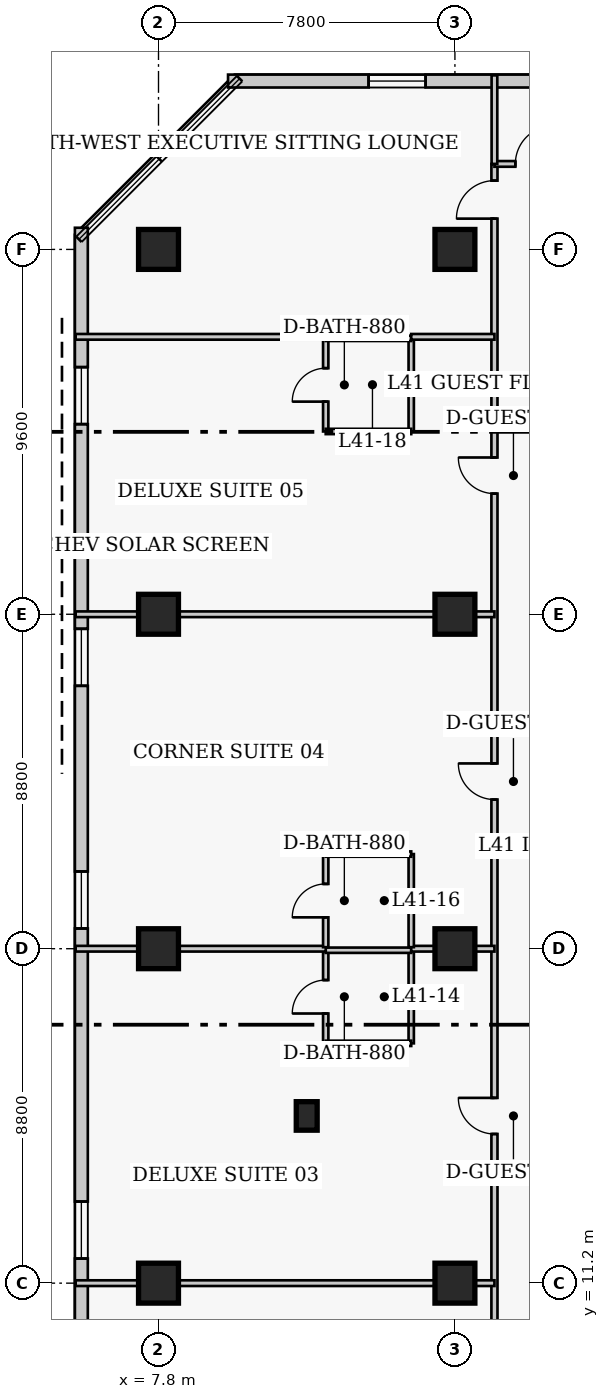
"""IFC4 building model, lengths in metres.
Left out: names, types, materials, properties, quantities, classifications, styles, units other than length and angle.
Written with IfcOpenShell. Run it as: python <this file> out.ifc"""

import sys

from ifc_helpers import new_model, si_unit, direction, frame, frame_2d, origin, origin_2d, place, context, subcontext, project, spatial, rectangle, extrude, element, fill, save


model = new_model("IFC4")
c1 = context("Model", 3, precision=1e-05, world=origin(), true_north=direction((0.0, 1.0)))
c2 = subcontext(c1, "Body", "Model", "MODEL_VIEW")
j1 = project(units=[si_unit("LENGTHUNIT", "METRE"), si_unit("PLANEANGLEUNIT", "RADIAN")], contexts=[c1])
p1 = place(None, origin())
s1 = spatial("IfcSite", under=j1, at=p1, CompositionType="ELEMENT")
p2 = place(p1, origin())
s2 = spatial("IfcBuilding", under=s1, at=p2, CompositionType="ELEMENT")
p3 = place(p2, frame((0.0, 0.0, 165.0)))
s3 = spatial("IfcBuildingStorey", under=s2, at=p3, CompositionType="ELEMENT", Elevation=165.0)
for number, where, z_axis, x_axis in (
    (1, (7.8, 11.2, 0.0), (0.0, 0.0, 1.0), (1.0, 0.0, 0.0)),
    (2, (7.8, 20.0, 0.0), (0.0, 0.0, 1.0), (1.0, 0.0, 0.0)),
    (3, (7.8, 28.8, 0.0), (0.0, 0.0, 1.0), (1.0, 0.0, 0.0)),
    (4, (7.8, 38.4, 0.0), (0.0, 0.0, 1.0), (1.0, 0.0, 0.0)),
    (5, (15.6, 11.2, 0.0), (0.0, 0.0, 1.0), (1.0, 0.0, 0.0)),
    (6, (15.6, 20.0, 0.0), (0.0, 0.0, 1.0), (1.0, 0.0, 0.0)),
    (7, (15.6, 28.8, 0.0), (0.0, 0.0, 1.0), (1.0, 0.0, 0.0)),
    (8, (15.6, 38.4, 0.0), (0.0, 0.0, 1.0), (1.0, 0.0, 0.0)),
):
    element("IfcColumn", number, at=place(p3, frame(where, z_axis=z_axis, x_axis=x_axis)), inside=s3, PredefinedType="COLUMN", context=c2, shape_type="SweptSolid", body=[
        extrude(rectangle(XDim=1.05, YDim=1.05, at=origin_2d()), origin(), (0.0, 0.0, 1.0), 3.8),
    ])
p4 = place(p3, frame((11.7, 15.6, 0.0), z_axis=(0.0, 0.0, 1.0), x_axis=(1.0, 0.0, 0.0)))
e9 = element("IfcColumn", 9, at=p4, inside=s3, PredefinedType="PILASTER", context=c2, shape_type="SweptSolid", body=[
    extrude(rectangle(XDim=0.55, YDim=0.75, at=origin_2d()), origin(), (0.0, 0.0, 1.0), 3.8),
])
p5 = place(p3, frame((36.32, 42.83, 0.0), z_axis=(0.0, 0.0, 1.0), x_axis=(-1.0, 0.0, 0.0)))
e10 = element("IfcWall", 10, at=p5, inside=s3, PredefinedType="SOLIDWALL", context=c2, shape_type="SweptSolid", body=[
    extrude(rectangle(XDim=26.69, YDim=0.34, at=frame_2d((13.345, 0.0))), origin(), (0.0, 0.0, 1.0), 3.55),
])
p6 = place(p5, frame((2.548, 0.0, 0.85)))
e11 = element("IfcOpeningElement", 11, at=p6, cuts=e10, PredefinedType="OPENING", context=c2, shape_type="SweptSolid", body=[
    extrude(rectangle(XDim=1.5, YDim=1.75, at=frame_2d((0.75, 0.875))), frame((0.0, 0.18, 0.0), z_axis=(0.0, -1.0, 0.0), x_axis=(1.0, 0.0, 0.0)), (0.0, 0.0, 1.0), 0.36),
])
p7 = place(p5, frame((12.595, 0.0, 0.85)))
e12 = element("IfcOpeningElement", 12, at=p7, cuts=e10, PredefinedType="OPENING", context=c2, shape_type="SweptSolid", body=[
    extrude(rectangle(XDim=1.5, YDim=1.75, at=frame_2d((0.75, 0.875))), frame((0.0, 0.18, 0.0), z_axis=(0.0, -1.0, 0.0), x_axis=(1.0, 0.0, 0.0)), (0.0, 0.0, 1.0), 0.36),
])
p8 = place(p5, frame((21.492, 0.0, 0.85)))
e13 = element("IfcOpeningElement", 13, at=p8, cuts=e10, PredefinedType="OPENING", context=c2, shape_type="SweptSolid", body=[
    extrude(rectangle(XDim=1.5, YDim=1.75, at=frame_2d((0.75, 0.875))), frame((0.0, 0.18, 0.0), z_axis=(0.0, -1.0, 0.0), x_axis=(1.0, 0.0, 0.0)), (0.0, 0.0, 1.0), 0.36),
])
p9 = place(p3, frame((5.77, 38.97, 0.0), z_axis=(0.0, 0.0, 1.0), x_axis=(0.0, -1.0, 0.0)))
e14 = element("IfcWall", 14, at=p9, inside=s3, PredefinedType="SOLIDWALL", context=c2, shape_type="SweptSolid", body=[
    extrude(rectangle(XDim=30.14, YDim=0.34, at=frame_2d((15.07, 0.0))), origin(), (0.0, 0.0, 1.0), 3.55),
])
p10 = place(p9, frame((3.667, 0.0, 0.85)))
e15 = element("IfcOpeningElement", 15, at=p10, cuts=e14, PredefinedType="OPENING", context=c2, shape_type="SweptSolid", body=[
    extrude(rectangle(XDim=1.5, YDim=1.75, at=frame_2d((0.75, 0.875))), frame((0.0, 0.18, 0.0), z_axis=(0.0, -1.0, 0.0), x_axis=(1.0, 0.0, 0.0)), (0.0, 0.0, 1.0), 0.36),
])
p11 = place(p9, frame((10.552, 0.0, 0.85)))
e16 = element("IfcOpeningElement", 16, at=p11, cuts=e14, PredefinedType="OPENING", context=c2, shape_type="SweptSolid", body=[
    extrude(rectangle(XDim=1.5, YDim=1.75, at=frame_2d((0.75, 0.875))), frame((0.0, 0.18, 0.0), z_axis=(0.0, -1.0, 0.0), x_axis=(1.0, 0.0, 0.0)), (0.0, 0.0, 1.0), 0.36),
])
p12 = place(p9, frame((16.938, 0.0, 0.85)))
e17 = element("IfcOpeningElement", 17, at=p12, cuts=e14, PredefinedType="OPENING", context=c2, shape_type="SweptSolid", body=[
    extrude(rectangle(XDim=1.5, YDim=1.75, at=frame_2d((0.75, 0.875))), frame((0.0, 0.18, 0.0), z_axis=(0.0, -1.0, 0.0), x_axis=(1.0, 0.0, 0.0)), (0.0, 0.0, 1.0), 0.36),
])
p13 = place(p9, frame((25.623, 0.0, 0.85)))
e18 = element("IfcOpeningElement", 18, at=p13, cuts=e14, PredefinedType="OPENING", context=c2, shape_type="SweptSolid", body=[
    extrude(rectangle(XDim=1.5, YDim=1.75, at=frame_2d((0.75, 0.875))), frame((0.0, 0.18, 0.0), z_axis=(0.0, -1.0, 0.0), x_axis=(1.0, 0.0, 0.0)), (0.0, 0.0, 1.0), 0.36),
])
p14 = place(p3, frame((16.64, 6.85, 0.0), z_axis=(0.0, 0.0, 1.0), x_axis=(0.0, 1.0, 0.0)))
e19 = element("IfcWall", 19, at=p14, inside=s3, PredefinedType="PARTITIONING", context=c2, shape_type="SweptSolid", body=[
    extrude(rectangle(XDim=33.8, YDim=0.16, at=frame_2d((16.9, 0.0))), origin(), (0.0, 0.0, 1.0), 3.55),
])
p15 = place(p14, frame((1.7, 0.0, 0.0)))
e20 = element("IfcOpeningElement", 20, at=p15, cuts=e19, PredefinedType="OPENING", context=c2, shape_type="SweptSolid", body=[
    extrude(rectangle(XDim=0.95, YDim=2.1, at=frame_2d((0.475, 1.05))), frame((0.0, 0.09, 0.0), z_axis=(0.0, -1.0, 0.0), x_axis=(1.0, 0.0, 0.0)), (0.0, 0.0, 1.0), 0.18),
])
p16 = place(p14, frame((8.275, 0.0, 0.0)))
e21 = element("IfcOpeningElement", 21, at=p16, cuts=e19, PredefinedType="OPENING", context=c2, shape_type="SweptSolid", body=[
    extrude(rectangle(XDim=0.95, YDim=2.1, at=frame_2d((0.475, 1.05))), frame((0.0, 0.09, 0.0), z_axis=(0.0, -1.0, 0.0), x_axis=(1.0, 0.0, 0.0)), (0.0, 0.0, 1.0), 0.18),
])
p17 = place(p14, frame((17.075, 0.0, 0.0)))
e22 = element("IfcOpeningElement", 22, at=p17, cuts=e19, PredefinedType="OPENING", context=c2, shape_type="SweptSolid", body=[
    extrude(rectangle(XDim=0.95, YDim=2.1, at=frame_2d((0.475, 1.05))), frame((0.0, 0.09, 0.0), z_axis=(0.0, -1.0, 0.0), x_axis=(1.0, 0.0, 0.0)), (0.0, 0.0, 1.0), 0.18),
])
p18 = place(p14, frame((25.125, 0.0, 0.0)))
e23 = element("IfcOpeningElement", 23, at=p18, cuts=e19, PredefinedType="OPENING", context=c2, shape_type="SweptSolid", body=[
    extrude(rectangle(XDim=0.95, YDim=2.1, at=frame_2d((0.475, 1.05))), frame((0.0, 0.09, 0.0), z_axis=(0.0, -1.0, 0.0), x_axis=(1.0, 0.0, 0.0)), (0.0, 0.0, 1.0), 0.18),
])
p19 = place(p14, frame((32.36, 0.0, 0.0)))
e24 = element("IfcOpeningElement", 24, at=p19, cuts=e19, PredefinedType="OPENING", context=c2, shape_type="SweptSolid", body=[
    extrude(rectangle(XDim=1.0, YDim=2.15, at=frame_2d((0.5, 1.075))), frame((0.0, 0.09, 0.0), z_axis=(0.0, -1.0, 0.0), x_axis=(1.0, 0.0, 0.0)), (0.0, 0.0, 1.0), 0.18),
])
p20 = place(p3, frame((16.64, 40.65, 0.0), z_axis=(0.0, 0.0, 1.0), x_axis=(1.0, 0.0, 0.0)))
e25 = element("IfcWall", 25, at=p20, inside=s3, PredefinedType="PARTITIONING", context=c2, shape_type="SweptSolid", body=[
    extrude(rectangle(XDim=5.46, YDim=0.15, at=frame_2d((2.73, 0.0))), origin(), (0.0, 0.0, 1.0), 3.55),
])
p21 = place(p20, frame((0.55, 0.0, 0.0)))
e26 = element("IfcOpeningElement", 26, at=p21, cuts=e25, PredefinedType="OPENING", context=c2, shape_type="SweptSolid", body=[
    extrude(rectangle(XDim=1.0, YDim=2.15, at=frame_2d((0.5, 1.075))), frame((0.0, 0.085, 0.0), z_axis=(0.0, -1.0, 0.0), x_axis=(1.0, 0.0, 0.0)), (0.0, 0.0, 1.0), 0.17),
])
p22 = place(p3, frame((16.64, 40.65, 0.0), z_axis=(0.0, 0.0, 1.0), x_axis=(0.0, 1.0, 0.0)))
e27 = element("IfcWall", 27, at=p22, inside=s3, PredefinedType="PARTITIONING", context=c2, shape_type="SweptSolid", body=[
    extrude(rectangle(XDim=2.33, YDim=0.15, at=frame_2d((1.165, 0.0))), origin(), (0.0, 0.0, 1.0), 3.55),
])
p23 = place(p3, frame((5.62, 11.2, 0.0), z_axis=(0.0, 0.0, 1.0), x_axis=(1.0, 0.0, 0.0)))
e28 = element("IfcWall", 28, at=p23, inside=s3, PredefinedType="PARTITIONING", context=c2, shape_type="SweptSolid", body=[
    extrude(rectangle(XDim=11.02, YDim=0.15, at=frame_2d((5.51, 0.0))), origin(), (0.0, 0.0, 1.0), 2.778),
])
p24 = place(p3, frame((12.2, 17.51, 0.0), z_axis=(0.0, 0.0, 1.0), x_axis=(0.0, 1.0, 0.0)))
e29 = element("IfcWall", 29, at=p24, inside=s3, PredefinedType="PLUMBINGWALL", context=c2, shape_type="SweptSolid", body=[
    extrude(rectangle(XDim=2.45, YDim=0.14, at=frame_2d((1.225, 0.0))), origin(), (0.0, 0.0, 1.0), 3.55),
])
p25 = place(p24, frame((0.785, 0.0, 0.0)))
e30 = element("IfcOpeningElement", 30, at=p25, cuts=e29, PredefinedType="OPENING", context=c2, shape_type="SweptSolid", body=[
    extrude(rectangle(XDim=0.88, YDim=2.05, at=frame_2d((0.44, 1.025))), frame((0.0, 0.08, 0.0), z_axis=(0.0, -1.0, 0.0), x_axis=(1.0, 0.0, 0.0)), (0.0, 0.0, 1.0), 0.16),
])
p26 = place(p3, frame((14.45, 17.51, 0.0), z_axis=(0.0, 0.0, 1.0), x_axis=(0.0, 1.0, 0.0)))
e31 = element("IfcWall", 31, at=p26, inside=s3, PredefinedType="PLUMBINGWALL", context=c2, shape_type="SweptSolid", body=[
    extrude(rectangle(XDim=2.45, YDim=0.14, at=frame_2d((1.225, 0.0))), origin(), (0.0, 0.0, 1.0), 3.55),
])
p27 = place(p3, frame((12.2, 17.51, 0.0), z_axis=(0.0, 0.0, 1.0), x_axis=(1.0, 0.0, 0.0)))
e32 = element("IfcWall", 32, at=p27, inside=s3, PredefinedType="PLUMBINGWALL", context=c2, shape_type="SweptSolid", body=[
    extrude(rectangle(XDim=2.25, YDim=0.14, at=frame_2d((1.125, 0.0))), origin(), (0.0, 0.0, 1.0), 3.55),
])
p28 = place(p3, frame((12.2, 19.96, 0.0), z_axis=(0.0, 0.0, 1.0), x_axis=(1.0, 0.0, 0.0)))
e33 = element("IfcWall", 33, at=p28, inside=s3, PredefinedType="PLUMBINGWALL", context=c2, shape_type="SweptSolid", body=[
    extrude(rectangle(XDim=2.25, YDim=0.14, at=frame_2d((1.125, 0.0))), origin(), (0.0, 0.0, 1.0), 2.9),
])
p29 = place(p3, frame((5.62, 20.0, 0.0), z_axis=(0.0, 0.0, 1.0), x_axis=(1.0, 0.0, 0.0)))
e34 = element("IfcWall", 34, at=p29, inside=s3, PredefinedType="PARTITIONING", context=c2, shape_type="SweptSolid", body=[
    extrude(rectangle(XDim=6.58, YDim=0.15, at=frame_2d((3.29, 0.0))), origin(), (0.0, 0.0, 1.0), 2.778),
])
p30 = place(p3, frame((14.45, 20.0, 0.0), z_axis=(0.0, 0.0, 1.0), x_axis=(1.0, 0.0, 0.0)))
e35 = element("IfcWall", 35, at=p30, inside=s3, PredefinedType="PARTITIONING", context=c2, shape_type="SweptSolid", body=[
    extrude(rectangle(XDim=2.19, YDim=0.15, at=frame_2d((1.095, 0.0))), origin(), (0.0, 0.0, 1.0), 2.778),
])
p31 = place(p3, frame((12.2, 20.04, 0.0), z_axis=(0.0, 0.0, 1.0), x_axis=(0.0, 1.0, 0.0)))
e36 = element("IfcWall", 36, at=p31, inside=s3, PredefinedType="PLUMBINGWALL", context=c2, shape_type="SweptSolid", body=[
    extrude(rectangle(XDim=2.45, YDim=0.14, at=frame_2d((1.225, 0.0))), origin(), (0.0, 0.0, 1.0), 3.55),
])
p32 = place(p31, frame((0.785, 0.0, 0.0)))
e37 = element("IfcOpeningElement", 37, at=p32, cuts=e36, PredefinedType="OPENING", context=c2, shape_type="SweptSolid", body=[
    extrude(rectangle(XDim=0.88, YDim=2.05, at=frame_2d((0.44, 1.025))), frame((0.0, 0.08, 0.0), z_axis=(0.0, -1.0, 0.0), x_axis=(1.0, 0.0, 0.0)), (0.0, 0.0, 1.0), 0.16),
])
p33 = place(p3, frame((14.45, 20.04, 0.0), z_axis=(0.0, 0.0, 1.0), x_axis=(0.0, 1.0, 0.0)))
e38 = element("IfcWall", 38, at=p33, inside=s3, PredefinedType="PLUMBINGWALL", context=c2, shape_type="SweptSolid", body=[
    extrude(rectangle(XDim=2.45, YDim=0.14, at=frame_2d((1.225, 0.0))), origin(), (0.0, 0.0, 1.0), 3.55),
])
p34 = place(p3, frame((12.2, 22.49, 0.0), z_axis=(0.0, 0.0, 1.0), x_axis=(1.0, 0.0, 0.0)))
e39 = element("IfcWall", 39, at=p34, inside=s3, PredefinedType="PLUMBINGWALL", context=c2, shape_type="SweptSolid", body=[
    extrude(rectangle(XDim=2.25, YDim=0.14, at=frame_2d((1.125, 0.0))), origin(), (0.0, 0.0, 1.0), 3.55),
])
p35 = place(p3, frame((5.62, 28.8, 0.0), z_axis=(0.0, 0.0, 1.0), x_axis=(1.0, 0.0, 0.0)))
e40 = element("IfcWall", 40, at=p35, inside=s3, PredefinedType="PARTITIONING", context=c2, shape_type="SweptSolid", body=[
    extrude(rectangle(XDim=11.02, YDim=0.15, at=frame_2d((5.51, 0.0))), origin(), (0.0, 0.0, 1.0), 2.778),
])
p36 = place(p3, frame((12.2, 33.61, 0.0), z_axis=(0.0, 0.0, 1.0), x_axis=(0.0, 1.0, 0.0)))
e41 = element("IfcWall", 41, at=p36, inside=s3, PredefinedType="PLUMBINGWALL", context=c2, shape_type="SweptSolid", body=[
    extrude(rectangle(XDim=2.45, YDim=0.14, at=frame_2d((1.225, 0.0))), origin(), (0.0, 0.0, 1.0), 3.55),
])
p37 = place(p36, frame((0.785, 0.0, 0.0)))
e42 = element("IfcOpeningElement", 42, at=p37, cuts=e41, PredefinedType="OPENING", context=c2, shape_type="SweptSolid", body=[
    extrude(rectangle(XDim=0.88, YDim=2.05, at=frame_2d((0.44, 1.025))), frame((0.0, 0.08, 0.0), z_axis=(0.0, -1.0, 0.0), x_axis=(1.0, 0.0, 0.0)), (0.0, 0.0, 1.0), 0.16),
])
p38 = place(p3, frame((14.45, 33.61, 0.0), z_axis=(0.0, 0.0, 1.0), x_axis=(0.0, 1.0, 0.0)))
e43 = element("IfcWall", 43, at=p38, inside=s3, PredefinedType="PLUMBINGWALL", context=c2, shape_type="SweptSolid", body=[
    extrude(rectangle(XDim=2.45, YDim=0.14, at=frame_2d((1.225, 0.0))), origin(), (0.0, 0.0, 1.0), 3.55),
])
for number, where, z_axis, x_axis in (
    (44, (12.2, 33.61, 0.0), (0.0, 0.0, 1.0), (1.0, 0.0, 0.0)),
    (45, (12.2, 36.06, 0.0), (0.0, 0.0, 1.0), (1.0, 0.0, 0.0)),
):
    element("IfcWall", number, at=place(p3, frame(where, z_axis=z_axis, x_axis=x_axis)), inside=s3, PredefinedType="PLUMBINGWALL", context=c2, shape_type="SweptSolid", body=[
        extrude(rectangle(XDim=2.25, YDim=0.14, at=frame_2d((1.125, 0.0))), origin(), (0.0, 0.0, 1.0), 3.55),
    ])
p39 = place(p3, frame((5.62, 36.1, 0.0), z_axis=(0.0, 0.0, 1.0), x_axis=(1.0, 0.0, 0.0)))
e46 = element("IfcWall", 46, at=p39, inside=s3, PredefinedType="PARTITIONING", context=c2, shape_type="SweptSolid", body=[
    extrude(rectangle(XDim=6.58, YDim=0.15, at=frame_2d((3.29, 0.0))), origin(), (0.0, 0.0, 1.0), 3.55),
])
p40 = place(p3, frame((14.45, 36.1, 0.0), z_axis=(0.0, 0.0, 1.0), x_axis=(1.0, 0.0, 0.0)))
e47 = element("IfcWall", 47, at=p40, inside=s3, PredefinedType="PARTITIONING", context=c2, shape_type="SweptSolid", body=[
    extrude(rectangle(XDim=2.19, YDim=0.15, at=frame_2d((1.095, 0.0))), origin(), (0.0, 0.0, 1.0), 3.55),
])
p41 = place(p8, origin())
e48 = element("IfcWindow", 48, at=p41, inside=s3, PartitioningType="SINGLE_PANEL", PredefinedType="WINDOW", context=c2, shape_type="SweptSolid", body=[
    extrude(rectangle(XDim=1.5, YDim=1.75, at=frame_2d((0.75, 0.875))), frame((0.0, 0.03, 0.0), z_axis=(0.0, -1.0, 0.0), x_axis=(1.0, 0.0, 0.0)), (0.0, 0.0, 1.0), 0.06),
])
fill(e13, e48)
p42 = place(p10, origin())
e49 = element("IfcWindow", 49, at=p42, inside=s3, PartitioningType="SINGLE_PANEL", PredefinedType="WINDOW", context=c2, shape_type="SweptSolid", body=[
    extrude(rectangle(XDim=1.5, YDim=1.75, at=frame_2d((0.75, 0.875))), frame((0.0, 0.03, 0.0), z_axis=(0.0, -1.0, 0.0), x_axis=(1.0, 0.0, 0.0)), (0.0, 0.0, 1.0), 0.06),
])
fill(e15, e49)
p43 = place(p11, origin())
e50 = element("IfcWindow", 50, at=p43, inside=s3, PartitioningType="SINGLE_PANEL", PredefinedType="WINDOW", context=c2, shape_type="SweptSolid", body=[
    extrude(rectangle(XDim=1.5, YDim=1.75, at=frame_2d((0.75, 0.875))), frame((0.0, 0.03, 0.0), z_axis=(0.0, -1.0, 0.0), x_axis=(1.0, 0.0, 0.0)), (0.0, 0.0, 1.0), 0.06),
])
fill(e16, e50)
p44 = place(p12, origin())
e51 = element("IfcWindow", 51, at=p44, inside=s3, PartitioningType="SINGLE_PANEL", PredefinedType="WINDOW", context=c2, shape_type="SweptSolid", body=[
    extrude(rectangle(XDim=1.5, YDim=1.75, at=frame_2d((0.75, 0.875))), frame((0.0, 0.03, 0.0), z_axis=(0.0, -1.0, 0.0), x_axis=(1.0, 0.0, 0.0)), (0.0, 0.0, 1.0), 0.06),
])
fill(e17, e51)
p45 = place(p13, origin())
e52 = element("IfcWindow", 52, at=p45, inside=s3, PartitioningType="SINGLE_PANEL", PredefinedType="WINDOW", context=c2, shape_type="SweptSolid", body=[
    extrude(rectangle(XDim=1.5, YDim=1.75, at=frame_2d((0.75, 0.875))), frame((0.0, 0.03, 0.0), z_axis=(0.0, -1.0, 0.0), x_axis=(1.0, 0.0, 0.0)), (0.0, 0.0, 1.0), 0.06),
])
fill(e18, e52)
p46 = place(p21, origin())
e53 = element("IfcDoor", 53, at=p46, inside=s3, OperationType="SINGLE_SWING_RIGHT", PredefinedType="DOOR", context=c2, shape_type="SweptSolid", body=[
    extrude(rectangle(XDim=1.0, YDim=2.15, at=frame_2d((0.5, 1.075))), frame((0.0, 0.025, 0.0), z_axis=(0.0, -1.0, 0.0), x_axis=(1.0, 0.0, 0.0)), (0.0, 0.0, 1.0), 0.05),
])
fill(e26, e53)
p47 = place(p25, origin())
e54 = element("IfcDoor", 54, at=p47, inside=s3, OperationType="SINGLE_SWING_LEFT", PredefinedType="DOOR", context=c2, shape_type="SweptSolid", body=[
    extrude(rectangle(XDim=0.88, YDim=2.05, at=frame_2d((0.44, 1.025))), frame((0.0, 0.025, 0.0), z_axis=(0.0, -1.0, 0.0), x_axis=(1.0, 0.0, 0.0)), (0.0, 0.0, 1.0), 0.05),
])
fill(e30, e54)
p48 = place(p16, origin())
e55 = element("IfcDoor", 55, at=p48, inside=s3, OperationType="SINGLE_SWING_RIGHT", PredefinedType="DOOR", context=c2, shape_type="SweptSolid", body=[
    extrude(rectangle(XDim=0.95, YDim=2.1, at=frame_2d((0.475, 1.05))), frame((0.0, 0.025, 0.0), z_axis=(0.0, -1.0, 0.0), x_axis=(1.0, 0.0, 0.0)), (0.0, 0.0, 1.0), 0.05),
])
fill(e21, e55)
p49 = place(p32, origin())
e56 = element("IfcDoor", 56, at=p49, inside=s3, OperationType="SINGLE_SWING_LEFT", PredefinedType="DOOR", context=c2, shape_type="SweptSolid", body=[
    extrude(rectangle(XDim=0.88, YDim=2.05, at=frame_2d((0.44, 1.025))), frame((0.0, 0.025, 0.0), z_axis=(0.0, -1.0, 0.0), x_axis=(1.0, 0.0, 0.0)), (0.0, 0.0, 1.0), 0.05),
])
fill(e37, e56)
p50 = place(p17, origin())
e57 = element("IfcDoor", 57, at=p50, inside=s3, OperationType="SINGLE_SWING_RIGHT", PredefinedType="DOOR", context=c2, shape_type="SweptSolid", body=[
    extrude(rectangle(XDim=0.95, YDim=2.1, at=frame_2d((0.475, 1.05))), frame((0.0, 0.025, 0.0), z_axis=(0.0, -1.0, 0.0), x_axis=(1.0, 0.0, 0.0)), (0.0, 0.0, 1.0), 0.05),
])
fill(e22, e57)
p51 = place(p37, origin())
e58 = element("IfcDoor", 58, at=p51, inside=s3, OperationType="SINGLE_SWING_LEFT", PredefinedType="DOOR", context=c2, shape_type="SweptSolid", body=[
    extrude(rectangle(XDim=0.88, YDim=2.05, at=frame_2d((0.44, 1.025))), frame((0.0, 0.025, 0.0), z_axis=(0.0, -1.0, 0.0), x_axis=(1.0, 0.0, 0.0)), (0.0, 0.0, 1.0), 0.05),
])
fill(e42, e58)
p52 = place(p18, origin())
e59 = element("IfcDoor", 59, at=p52, inside=s3, OperationType="SINGLE_SWING_RIGHT", PredefinedType="DOOR", context=c2, shape_type="SweptSolid", body=[
    extrude(rectangle(XDim=0.95, YDim=2.1, at=frame_2d((0.475, 1.05))), frame((0.0, 0.025, 0.0), z_axis=(0.0, -1.0, 0.0), x_axis=(1.0, 0.0, 0.0)), (0.0, 0.0, 1.0), 0.05),
])
fill(e23, e59)
p53 = place(p19, origin())
e60 = element("IfcDoor", 60, at=p53, inside=s3, OperationType="SINGLE_SWING_LEFT", PredefinedType="DOOR", context=c2, shape_type="SweptSolid", body=[
    extrude(rectangle(XDim=1.0, YDim=2.15, at=frame_2d((0.5, 1.075))), frame((0.0, 0.025, 0.0), z_axis=(0.0, -1.0, 0.0), x_axis=(1.0, 0.0, 0.0)), (0.0, 0.0, 1.0), 0.05),
])
fill(e24, e60)
save(model, sys.argv[1])
